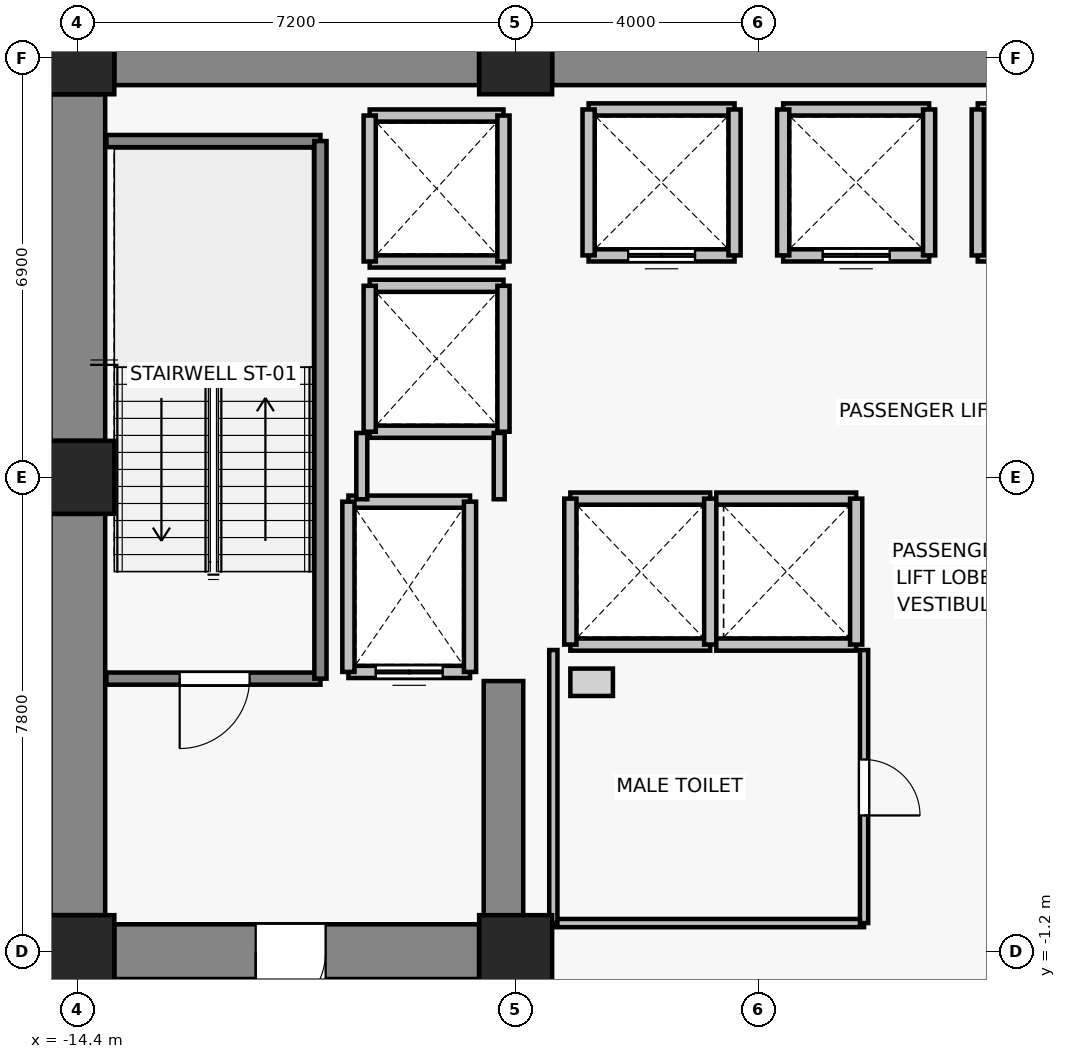
"""IFC4 building model, lengths in metres.
Left out: names, types, materials, properties, quantities, classifications, styles, units other than length and angle.
Written with IfcOpenShell. Run it as: python <this file> out.ifc"""

import sys

from ifc_helpers import new_model, si_unit, direction, frame, frame_2d, origin, origin_2d, place, context, subcontext, project, spatial, rectangle, extrude, source, transform, mapped, element, fill, save


model = new_model("IFC4")
c1 = context("Model", 3, precision=1e-05, world=origin(), true_north=direction((0.0, 1.0)))
c2 = subcontext(c1, "Body", "Model", "MODEL_VIEW")
j1 = project(units=[si_unit("LENGTHUNIT", "METRE"), si_unit("PLANEANGLEUNIT", "RADIAN")], contexts=[c1])
p1 = place(None, origin())
s1 = spatial("IfcSite", under=j1, at=p1, CompositionType="ELEMENT")
p2 = place(p1, origin())
s2 = spatial("IfcBuilding", under=s1, at=p2, CompositionType="ELEMENT")
p3 = place(p2, frame((0.0, 0.0, 18.2)))
s3 = spatial("IfcBuildingStorey", under=s2, at=p3, CompositionType="ELEMENT", Elevation=18.2)
for number, where, z_axis, x_axis in (
    (1, (-14.4, -1.2, 0.0), (0.0, 0.0, 1.0), (1.0, 0.0, 0.0)),
    (2, (-7.2, -1.2, 0.0), (0.0, 0.0, 1.0), (1.0, 0.0, 0.0)),
    (3, (-14.4, 6.6, 0.0), (0.0, 0.0, 1.0), (1.0, 0.0, 0.0)),
    (4, (-14.4, 13.5, 0.0), (0.0, 0.0, 1.0), (1.0, 0.0, 0.0)),
    (5, (-7.2, 13.5, 0.0), (0.0, 0.0, 1.0), (1.0, 0.0, 0.0)),
):
    element("IfcColumn", number, at=place(p3, frame(where, z_axis=z_axis, x_axis=x_axis)), inside=s3, PredefinedType="COLUMN", context=c2, shape_type="SweptSolid", body=[
        extrude(rectangle(XDim=1.2, YDim=1.2, at=origin_2d()), origin(), (0.0, 0.0, 1.0), 4.4),
    ])
p4 = place(p3, frame((-13.8, 13.5, 0.0), z_axis=(0.0, 0.0, 1.0), x_axis=(1.0, 0.0, 0.0)))
e6 = element("IfcWall", 6, at=p4, inside=s3, PredefinedType="SHEAR", context=c2, shape_type="SweptSolid", body=[
    extrude(rectangle(XDim=6.0, YDim=0.9, at=frame_2d((3.0, 0.0))), origin(), (0.0, 0.0, 1.0), 4.1),
])
p5 = place(p3, frame((-6.6, 13.5, 0.0), z_axis=(0.0, 0.0, 1.0), x_axis=(1.0, 0.0, 0.0)))
e7 = element("IfcWall", 7, at=p5, inside=s3, PredefinedType="SHEAR", context=c2, shape_type="SweptSolid", body=[
    extrude(rectangle(XDim=13.2, YDim=0.9, at=frame_2d((6.6, 0.0))), origin(), (0.0, 0.0, 1.0), 4.1),
])
p6 = place(p3, frame((-14.4, -0.6, 0.0), z_axis=(0.0, 0.0, 1.0), x_axis=(0.0, 1.0, 0.0)))
e8 = element("IfcWall", 8, at=p6, inside=s3, PredefinedType="SHEAR", context=c2, shape_type="SweptSolid", body=[
    extrude(rectangle(XDim=6.6, YDim=0.9, at=frame_2d((3.3, 0.0))), origin(), (0.0, 0.0, 1.0), 4.1),
])
p7 = place(p3, frame((-14.4, 7.2, 0.0), z_axis=(0.0, 0.0, 1.0), x_axis=(0.0, 1.0, 0.0)))
e9 = element("IfcWall", 9, at=p7, inside=s3, PredefinedType="SHEAR", context=c2, shape_type="SweptSolid", body=[
    extrude(rectangle(XDim=5.7, YDim=0.9, at=frame_2d((2.85, 0.0))), origin(), (0.0, 0.0, 1.0), 4.1),
])
p8 = place(p3, frame((-7.8, -1.2, 0.0), z_axis=(0.0, 0.0, 1.0), x_axis=(-1.0, 0.0, 0.0)))
e10 = element("IfcWall", 10, at=p8, inside=s3, PredefinedType="SHEAR", context=c2, shape_type="SweptSolid", body=[
    extrude(rectangle(XDim=6.0, YDim=0.9, at=frame_2d((3.0, 0.0))), origin(), (0.0, 0.0, 1.0), 4.1),
])
p9 = place(p8, frame((2.525, 0.0, 0.0)))
e11 = element("IfcOpeningElement", 11, at=p9, cuts=e10, PredefinedType="OPENING", context=c2, shape_type="SweptSolid", body=[
    extrude(rectangle(XDim=1.15, YDim=2.15, at=frame_2d((0.575, 1.075))), frame((0.0, 0.46, 0.0), z_axis=(0.0, -1.0, 0.0), x_axis=(1.0, 0.0, 0.0)), (0.0, 0.0, 1.0), 0.92),
])
p10 = place(p3, frame((-7.4, -0.75, 0.0), z_axis=(0.0, 0.0, 1.0), x_axis=(0.0, 1.0, 0.0)))
e12 = element("IfcWall", 12, at=p10, inside=s3, PredefinedType="SHEAR", context=c2, shape_type="SweptSolid", body=[
    extrude(rectangle(XDim=4.0, YDim=0.65, at=frame_2d((2.0, 0.0))), origin(), (0.0, 0.0, 1.0), 4.1),
])
p11 = place(p3, frame((-7.95, 3.4, 0.0), z_axis=(0.0, 0.0, 1.0), x_axis=(-1.0, 0.0, 0.0)))
e13 = element("IfcWall", 13, at=p11, inside=s3, PredefinedType="SOLIDWALL", context=c2, shape_type="SweptSolid", body=[
    extrude(rectangle(XDim=2.0, YDim=0.2, at=frame_2d((1.0, 0.0))), origin(), (0.0, 0.0, 1.0), 4.1),
])
p12 = place(p11, frame((0.45, 0.0, 0.0)))
e14 = element("IfcOpeningElement", 14, at=p12, cuts=e13, PredefinedType="OPENING", context=c2, shape_type="SweptSolid", body=[
    extrude(rectangle(XDim=1.1, YDim=2.2, at=frame_2d((0.55, 1.1))), frame((0.0, 0.11, 0.0), z_axis=(0.0, -1.0, 0.0), x_axis=(1.0, 0.0, 0.0)), (0.0, 0.0, 1.0), 0.22),
])
p13 = place(p3, frame((-9.95, 6.2, 0.0), z_axis=(0.0, 0.0, 1.0), x_axis=(1.0, 0.0, 0.0)))
e15 = element("IfcWall", 15, at=p13, inside=s3, PredefinedType="SOLIDWALL", context=c2, shape_type="SweptSolid", body=[
    extrude(rectangle(XDim=2.0, YDim=0.2, at=frame_2d((1.0, 0.0))), origin(), (0.0, 0.0, 1.0), 4.1),
])
for number, where, z_axis, x_axis in (
    (16, (-9.95, 3.4, 0.0), (0.0, 0.0, 1.0), (0.0, 1.0, 0.0)),
    (17, (-7.95, 6.2, 0.0), (0.0, 0.0, 1.0), (0.0, -1.0, 0.0)),
):
    element("IfcWall", number, at=place(p3, frame(where, z_axis=z_axis, x_axis=x_axis)), inside=s3, PredefinedType="SOLIDWALL", context=c2, shape_type="SweptSolid", body=[
        extrude(rectangle(XDim=2.8, YDim=0.2, at=frame_2d((1.4, 0.0))), origin(), (0.0, 0.0, 1.0), 4.1),
    ])
p14 = place(p3, frame((-3.6, 10.25, 0.0), z_axis=(0.0, 0.0, 1.0), x_axis=(-1.0, 0.0, 0.0)))
e18 = element("IfcWall", 18, at=p14, inside=s3, PredefinedType="SOLIDWALL", context=c2, shape_type="SweptSolid", body=[
    extrude(rectangle(XDim=2.4, YDim=0.2, at=frame_2d((1.2, 0.0))), origin(), (0.0, 0.0, 1.0), 4.1),
])
p15 = place(p14, frame((0.65, 0.0, 0.0)))
e19 = element("IfcOpeningElement", 19, at=p15, cuts=e18, PredefinedType="OPENING", context=c2, shape_type="SweptSolid", body=[
    extrude(rectangle(XDim=1.1, YDim=2.2, at=frame_2d((0.55, 1.1))), frame((0.0, 0.11, 0.0), z_axis=(0.0, -1.0, 0.0), x_axis=(1.0, 0.0, 0.0)), (0.0, 0.0, 1.0), 0.22),
])
for number, where, z_axis, x_axis in (
    (20, (-6.0, 12.65, 0.0), (0.0, 0.0, 1.0), (1.0, 0.0, 0.0)),
    (21, (-6.0, 10.25, 0.0), (0.0, 0.0, 1.0), (0.0, 1.0, 0.0)),
    (22, (-3.6, 12.65, 0.0), (0.0, 0.0, 1.0), (0.0, -1.0, 0.0)),
):
    element("IfcWall", number, at=place(p3, frame(where, z_axis=z_axis, x_axis=x_axis)), inside=s3, PredefinedType="SOLIDWALL", context=c2, shape_type="SweptSolid", body=[
        extrude(rectangle(XDim=2.4, YDim=0.2, at=frame_2d((1.2, 0.0))), origin(), (0.0, 0.0, 1.0), 4.1),
    ])
p16 = place(p3, frame((-0.4, 10.25, 0.0), z_axis=(0.0, 0.0, 1.0), x_axis=(-1.0, 0.0, 0.0)))
e23 = element("IfcWall", 23, at=p16, inside=s3, PredefinedType="SOLIDWALL", context=c2, shape_type="SweptSolid", body=[
    extrude(rectangle(XDim=2.4, YDim=0.2, at=frame_2d((1.2, 0.0))), origin(), (0.0, 0.0, 1.0), 4.1),
])
p17 = place(p16, frame((0.65, 0.0, 0.0)))
e24 = element("IfcOpeningElement", 24, at=p17, cuts=e23, PredefinedType="OPENING", context=c2, shape_type="SweptSolid", body=[
    extrude(rectangle(XDim=1.1, YDim=2.2, at=frame_2d((0.55, 1.1))), frame((0.0, 0.11, 0.0), z_axis=(0.0, -1.0, 0.0), x_axis=(1.0, 0.0, 0.0)), (0.0, 0.0, 1.0), 0.22),
])
p18 = place(p3, frame((-2.8, 12.65, 0.0), z_axis=(0.0, 0.0, 1.0), x_axis=(1.0, 0.0, 0.0)))
e25 = element("IfcWall", 25, at=p18, inside=s3, PredefinedType="SOLIDWALL", context=c2, shape_type="SweptSolid", body=[
    extrude(rectangle(XDim=2.4, YDim=0.2, at=frame_2d((1.2, 0.0))), origin(), (0.0, 0.0, 1.0), 4.1),
])
for number, where, z_axis, x_axis in (
    (26, (-2.8, 10.25, 0.0), (0.0, 0.0, 1.0), (0.0, 1.0, 0.0)),
    (27, (-0.4, 12.65, 0.0), (0.0, 0.0, 1.0), (0.0, -1.0, 0.0)),
):
    element("IfcWall", number, at=place(p3, frame(where, z_axis=z_axis, x_axis=x_axis)), inside=s3, PredefinedType="SOLIDWALL", context=c2, shape_type="SweptSolid", body=[
        extrude(rectangle(XDim=2.4, YDim=0.2, at=frame_2d((1.2, 0.0))), origin(), (0.0, 0.0, 1.0), 4.1),
    ])
p19 = place(p3, frame((2.8, 10.25, 0.0), z_axis=(0.0, 0.0, 1.0), x_axis=(-1.0, 0.0, 0.0)))
e28 = element("IfcWall", 28, at=p19, inside=s3, PredefinedType="SOLIDWALL", context=c2, shape_type="SweptSolid", body=[
    extrude(rectangle(XDim=2.4, YDim=0.2, at=frame_2d((1.2, 0.0))), origin(), (0.0, 0.0, 1.0), 4.1),
])
p20 = place(p19, frame((0.65, 0.0, 0.0)))
e29 = element("IfcOpeningElement", 29, at=p20, cuts=e28, PredefinedType="OPENING", context=c2, shape_type="SweptSolid", body=[
    extrude(rectangle(XDim=1.1, YDim=2.2, at=frame_2d((0.55, 1.1))), frame((0.0, 0.11, 0.0), z_axis=(0.0, -1.0, 0.0), x_axis=(1.0, 0.0, 0.0)), (0.0, 0.0, 1.0), 0.22),
])
p21 = place(p3, frame((0.4, 12.65, 0.0), z_axis=(0.0, 0.0, 1.0), x_axis=(1.0, 0.0, 0.0)))
e30 = element("IfcWall", 30, at=p21, inside=s3, PredefinedType="SOLIDWALL", context=c2, shape_type="SweptSolid", body=[
    extrude(rectangle(XDim=2.4, YDim=0.2, at=frame_2d((1.2, 0.0))), origin(), (0.0, 0.0, 1.0), 4.1),
])
p22 = place(p3, frame((0.4, 10.25, 0.0), z_axis=(0.0, 0.0, 1.0), x_axis=(0.0, 1.0, 0.0)))
e31 = element("IfcWall", 31, at=p22, inside=s3, PredefinedType="SOLIDWALL", context=c2, shape_type="SweptSolid", body=[
    extrude(rectangle(XDim=2.4, YDim=0.2, at=frame_2d((1.2, 0.0))), origin(), (0.0, 0.0, 1.0), 4.1),
])
for number, where, z_axis, x_axis in (
    (32, (-4.0, 3.85, 0.0), (0.0, 0.0, 1.0), (-1.0, 0.0, 0.0)),
    (33, (-6.3, 6.25, 0.0), (0.0, 0.0, 1.0), (1.0, 0.0, 0.0)),
):
    element("IfcWall", number, at=place(p3, frame(where, z_axis=z_axis, x_axis=x_axis)), inside=s3, PredefinedType="SOLIDWALL", context=c2, shape_type="SweptSolid", body=[
        extrude(rectangle(XDim=2.3, YDim=0.2, at=frame_2d((1.15, 0.0))), origin(), (0.0, 0.0, 1.0), 4.1),
    ])
for number, where, z_axis, x_axis in (
    (34, (-6.3, 3.85, 0.0), (0.0, 0.0, 1.0), (0.0, 1.0, 0.0)),
    (35, (-4.0, 6.25, 0.0), (0.0, 0.0, 1.0), (0.0, -1.0, 0.0)),
):
    element("IfcWall", number, at=place(p3, frame(where, z_axis=z_axis, x_axis=x_axis)), inside=s3, PredefinedType="SOLIDWALL", context=c2, shape_type="SweptSolid", body=[
        extrude(rectangle(XDim=2.4, YDim=0.2, at=frame_2d((1.2, 0.0))), origin(), (0.0, 0.0, 1.0), 4.1),
    ])
for number, where, z_axis, x_axis in (
    (36, (-1.6, 3.85, 0.0), (0.0, 0.0, 1.0), (-1.0, 0.0, 0.0)),
    (37, (-3.9, 6.25, 0.0), (0.0, 0.0, 1.0), (1.0, 0.0, 0.0)),
):
    element("IfcWall", number, at=place(p3, frame(where, z_axis=z_axis, x_axis=x_axis)), inside=s3, PredefinedType="SOLIDWALL", context=c2, shape_type="SweptSolid", body=[
        extrude(rectangle(XDim=2.3, YDim=0.2, at=frame_2d((1.15, 0.0))), origin(), (0.0, 0.0, 1.0), 4.1),
    ])
p23 = place(p3, frame((-1.6, 6.25, 0.0), z_axis=(0.0, 0.0, 1.0), x_axis=(0.0, -1.0, 0.0)))
e38 = element("IfcWall", 38, at=p23, inside=s3, PredefinedType="SOLIDWALL", context=c2, shape_type="SweptSolid", body=[
    extrude(rectangle(XDim=2.4, YDim=0.2, at=frame_2d((1.2, 0.0))), origin(), (0.0, 0.0, 1.0), 4.1),
])
for number, where, z_axis, x_axis in (
    (39, (-7.4, 7.35, 0.0), (0.0, 0.0, 1.0), (-1.0, 0.0, 0.0)),
    (40, (-9.6, 9.75, 0.0), (0.0, 0.0, 1.0), (1.0, 0.0, 0.0)),
):
    element("IfcWall", number, at=place(p3, frame(where, z_axis=z_axis, x_axis=x_axis)), inside=s3, PredefinedType="SOLIDWALL", context=c2, shape_type="SweptSolid", body=[
        extrude(rectangle(XDim=2.2, YDim=0.2, at=frame_2d((1.1, 0.0))), origin(), (0.0, 0.0, 1.0), 3.19),
    ])
p24 = place(p3, frame((-9.6, 7.35, 0.0), z_axis=(0.0, 0.0, 1.0), x_axis=(0.0, 1.0, 0.0)))
e41 = element("IfcWall", 41, at=p24, inside=s3, PredefinedType="SOLIDWALL", context=c2, shape_type="SweptSolid", body=[
    extrude(rectangle(XDim=2.4, YDim=0.2, at=frame_2d((1.2, 0.0))), origin(), (0.0, 0.0, 1.0), 4.1),
])
p25 = place(p3, frame((-7.4, 9.75, 0.0), z_axis=(0.0, 0.0, 1.0), x_axis=(0.0, -1.0, 0.0)))
e42 = element("IfcWall", 42, at=p25, inside=s3, PredefinedType="SOLIDWALL", context=c2, shape_type="SweptSolid", body=[
    extrude(rectangle(XDim=2.4, YDim=0.2, at=frame_2d((1.2, 0.0))), origin(), (0.0, 0.0, 1.0), 3.19),
])
for number, where, z_axis, x_axis in (
    (43, (-7.4, 10.15, 0.0), (0.0, 0.0, 1.0), (-1.0, 0.0, 0.0)),
    (44, (-9.6, 12.55, 0.0), (0.0, 0.0, 1.0), (1.0, 0.0, 0.0)),
):
    element("IfcWall", number, at=place(p3, frame(where, z_axis=z_axis, x_axis=x_axis)), inside=s3, PredefinedType="SOLIDWALL", context=c2, shape_type="SweptSolid", body=[
        extrude(rectangle(XDim=2.2, YDim=0.2, at=frame_2d((1.1, 0.0))), origin(), (0.0, 0.0, 1.0), 3.19),
    ])
p26 = place(p3, frame((-9.6, 10.15, 0.0), z_axis=(0.0, 0.0, 1.0), x_axis=(0.0, 1.0, 0.0)))
e45 = element("IfcWall", 45, at=p26, inside=s3, PredefinedType="SOLIDWALL", context=c2, shape_type="SweptSolid", body=[
    extrude(rectangle(XDim=2.4, YDim=0.2, at=frame_2d((1.2, 0.0))), origin(), (0.0, 0.0, 1.0), 4.1),
])
p27 = place(p3, frame((-7.4, 12.55, 0.0), z_axis=(0.0, 0.0, 1.0), x_axis=(0.0, -1.0, 0.0)))
e46 = element("IfcWall", 46, at=p27, inside=s3, PredefinedType="SOLIDWALL", context=c2, shape_type="SweptSolid", body=[
    extrude(rectangle(XDim=2.4, YDim=0.2, at=frame_2d((1.2, 0.0))), origin(), (0.0, 0.0, 1.0), 3.19),
])
p28 = place(p3, frame((-10.41, 3.29, 0.0), z_axis=(0.0, 0.0, 1.0), x_axis=(-1.0, 0.0, 0.0)))
e47 = element("IfcWall", 47, at=p28, inside=s3, PredefinedType="SOLIDWALL", context=c2, shape_type="SweptSolid", body=[
    extrude(rectangle(XDim=3.52, YDim=0.2, at=frame_2d((1.76, 0.0))), origin(), (0.0, 0.0, 1.0), 4.1),
])
p29 = place(p28, frame((1.165, 0.0, 0.0)))
e48 = element("IfcOpeningElement", 48, at=p29, cuts=e47, PredefinedType="OPENING", context=c2, shape_type="SweptSolid", body=[
    extrude(rectangle(XDim=1.15, YDim=2.15, at=frame_2d((0.575, 1.075))), frame((0.0, 0.11, 0.0), z_axis=(0.0, -1.0, 0.0), x_axis=(1.0, 0.0, 0.0)), (0.0, 0.0, 1.0), 0.22),
])
p30 = place(p3, frame((-13.93, 12.13, 0.0), z_axis=(0.0, 0.0, 1.0), x_axis=(1.0, 0.0, 0.0)))
e49 = element("IfcWall", 49, at=p30, inside=s3, PredefinedType="SOLIDWALL", context=c2, shape_type="SweptSolid", body=[
    extrude(rectangle(XDim=3.52, YDim=0.2, at=frame_2d((1.76, 0.0))), origin(), (0.0, 0.0, 1.0), 4.1),
])
p31 = place(p3, frame((-10.41, 12.13, 0.0), z_axis=(0.0, 0.0, 1.0), x_axis=(0.0, -1.0, 0.0)))
e50 = element("IfcWall", 50, at=p31, inside=s3, PredefinedType="SOLIDWALL", context=c2, shape_type="SweptSolid", body=[
    extrude(rectangle(XDim=8.84, YDim=0.2, at=frame_2d((4.42, 0.0))), origin(), (0.0, 0.0, 1.0), 4.1),
])
p32 = place(p3, frame((-9.73, 6.24, 0.0), z_axis=(0.0, 0.0, 1.0), x_axis=(0.0, 1.0, 0.0)))
e51 = element("IfcWall", 51, at=p32, inside=s3, PredefinedType="PARTITIONING", context=c2, shape_type="SweptSolid", body=[
    extrude(rectangle(XDim=1.09, YDim=0.18, at=frame_2d((0.545, 0.0))), origin(), (0.0, 0.0, 1.0), 4.1),
])
p33 = place(p3, frame((-7.47, 7.33, 0.0), z_axis=(0.0, 0.0, 1.0), x_axis=(0.0, -1.0, 0.0)))
e52 = element("IfcWall", 52, at=p33, inside=s3, PredefinedType="PARTITIONING", context=c2, shape_type="SweptSolid", body=[
    extrude(rectangle(XDim=1.09, YDim=0.18, at=frame_2d((0.545, 0.0))), origin(), (0.0, 0.0, 1.0), 3.19),
])
p34 = place(p3, frame((-1.47, -0.73, 0.0), z_axis=(0.0, 0.0, 1.0), x_axis=(-1.0, 0.0, 0.0)))
e53 = element("IfcWall", 53, at=p34, inside=s3, PredefinedType="PARTITIONING", context=c2, shape_type="SweptSolid", body=[
    extrude(rectangle(XDim=5.11, YDim=0.135, at=frame_2d((2.555, 0.0))), origin(), (0.0, 0.0, 1.0), 4.1),
])
p35 = place(p3, frame((-6.58, -0.73, 0.0), z_axis=(0.0, 0.0, 1.0), x_axis=(0.0, 1.0, 0.0)))
e54 = element("IfcWall", 54, at=p35, inside=s3, PredefinedType="PARTITIONING", context=c2, shape_type="SweptSolid", body=[
    extrude(rectangle(XDim=4.49, YDim=0.135, at=frame_2d((2.245, 0.0))), origin(), (0.0, 0.0, 1.0), 3.473),
])
p36 = place(p3, frame((-1.47, 3.76, 0.0), z_axis=(0.0, 0.0, 1.0), x_axis=(0.0, -1.0, 0.0)))
e55 = element("IfcWall", 55, at=p36, inside=s3, PredefinedType="PARTITIONING", context=c2, shape_type="SweptSolid", body=[
    extrude(rectangle(XDim=4.49, YDim=0.135, at=frame_2d((2.245, 0.0))), origin(), (0.0, 0.0, 1.0), 3.473),
])
p37 = place(p36, frame((1.8, 0.0, 0.0)))
e56 = element("IfcOpeningElement", 56, at=p37, cuts=e55, PredefinedType="OPENING", context=c2, shape_type="SweptSolid", body=[
    extrude(rectangle(XDim=0.92, YDim=2.1, at=frame_2d((0.46, 1.05))), frame((0.0, 0.077, 0.0), z_axis=(0.0, -1.0, 0.0), x_axis=(1.0, 0.0, 0.0)), (0.0, 0.0, 1.0), 0.155),
])
m1 = source(origin(), c2, "Body", "SweptSolid", [
    extrude(rectangle(XDim=1.1, YDim=2.2, at=frame_2d((0.55, 1.1))), frame((0.0, 0.025, 0.0), z_axis=(0.0, -1.0, 0.0), x_axis=(1.0, 0.0, 0.0)), (0.0, 0.0, 1.0), 0.05),
])
p38 = place(p12, origin())
e57 = element("IfcDoor", 57, at=p38, inside=s3, OperationType="DOUBLE_DOOR_SLIDING", PredefinedType="DOOR", context=c2, shape_type="MappedRepresentation", body=[
    mapped(m1, transform((0.0, 0.0, 0.0), x_axis=(1.0, 0.0, 0.0), y_axis=(0.0, 1.0, 0.0), z_axis=(0.0, 0.0, 1.0), scale=1.0)),
])
fill(e14, e57)
p39 = place(p15, origin())
e58 = element("IfcDoor", 58, at=p39, inside=s3, OperationType="DOUBLE_DOOR_SLIDING", PredefinedType="DOOR", context=c2, shape_type="MappedRepresentation", body=[
    mapped(m1, transform((0.0, 0.0, 0.0), x_axis=(1.0, 0.0, 0.0), y_axis=(0.0, 1.0, 0.0), z_axis=(0.0, 0.0, 1.0), scale=1.0)),
])
fill(e19, e58)
p40 = place(p17, origin())
e59 = element("IfcDoor", 59, at=p40, inside=s3, OperationType="DOUBLE_DOOR_SLIDING", PredefinedType="DOOR", context=c2, shape_type="MappedRepresentation", body=[
    mapped(m1, transform((0.0, 0.0, 0.0), x_axis=(1.0, 0.0, 0.0), y_axis=(0.0, 1.0, 0.0), z_axis=(0.0, 0.0, 1.0), scale=1.0)),
])
fill(e24, e59)
m2 = source(origin(), c2, "Body", "SweptSolid", [
    extrude(rectangle(XDim=1.15, YDim=2.15, at=frame_2d((0.575, 1.075))), frame((0.0, 0.025, 0.0), z_axis=(0.0, -1.0, 0.0), x_axis=(1.0, 0.0, 0.0)), (0.0, 0.0, 1.0), 0.05),
])
p41 = place(p29, origin())
e60 = element("IfcDoor", 60, at=p41, inside=s3, OperationType="SINGLE_SWING_RIGHT", PredefinedType="DOOR", context=c2, shape_type="MappedRepresentation", body=[
    mapped(m2, transform((0.0, 0.0, 0.0), x_axis=(1.0, 0.0, 0.0), y_axis=(0.0, 1.0, 0.0), z_axis=(0.0, 0.0, 1.0), scale=1.0)),
])
fill(e48, e60)
p42 = place(p9, origin())
e61 = element("IfcDoor", 61, at=p42, inside=s3, OperationType="SINGLE_SWING_RIGHT", PredefinedType="DOOR", context=c2, shape_type="MappedRepresentation", body=[
    mapped(m2, transform((0.0, 0.0, 0.0), x_axis=(1.0, 0.0, 0.0), y_axis=(0.0, 1.0, 0.0), z_axis=(0.0, 0.0, 1.0), scale=1.0)),
])
fill(e11, e61)
m3 = source(origin(), c2, "Body", "SweptSolid", [
    extrude(rectangle(XDim=0.92, YDim=2.1, at=frame_2d((0.46, 1.05))), frame((0.0, 0.025, 0.0), z_axis=(0.0, -1.0, 0.0), x_axis=(1.0, 0.0, 0.0)), (0.0, 0.0, 1.0), 0.05),
])
p43 = place(p37, origin())
e62 = element("IfcDoor", 62, at=p43, inside=s3, OperationType="SINGLE_SWING_RIGHT", PredefinedType="DOOR", context=c2, shape_type="MappedRepresentation", body=[
    mapped(m3, transform((0.0, 0.0, 0.0), x_axis=(1.0, 0.0, 0.0), y_axis=(0.0, 1.0, 0.0), z_axis=(0.0, 0.0, 1.0), scale=1.0)),
])
fill(e56, e62)
save(model, sys.argv[1])
